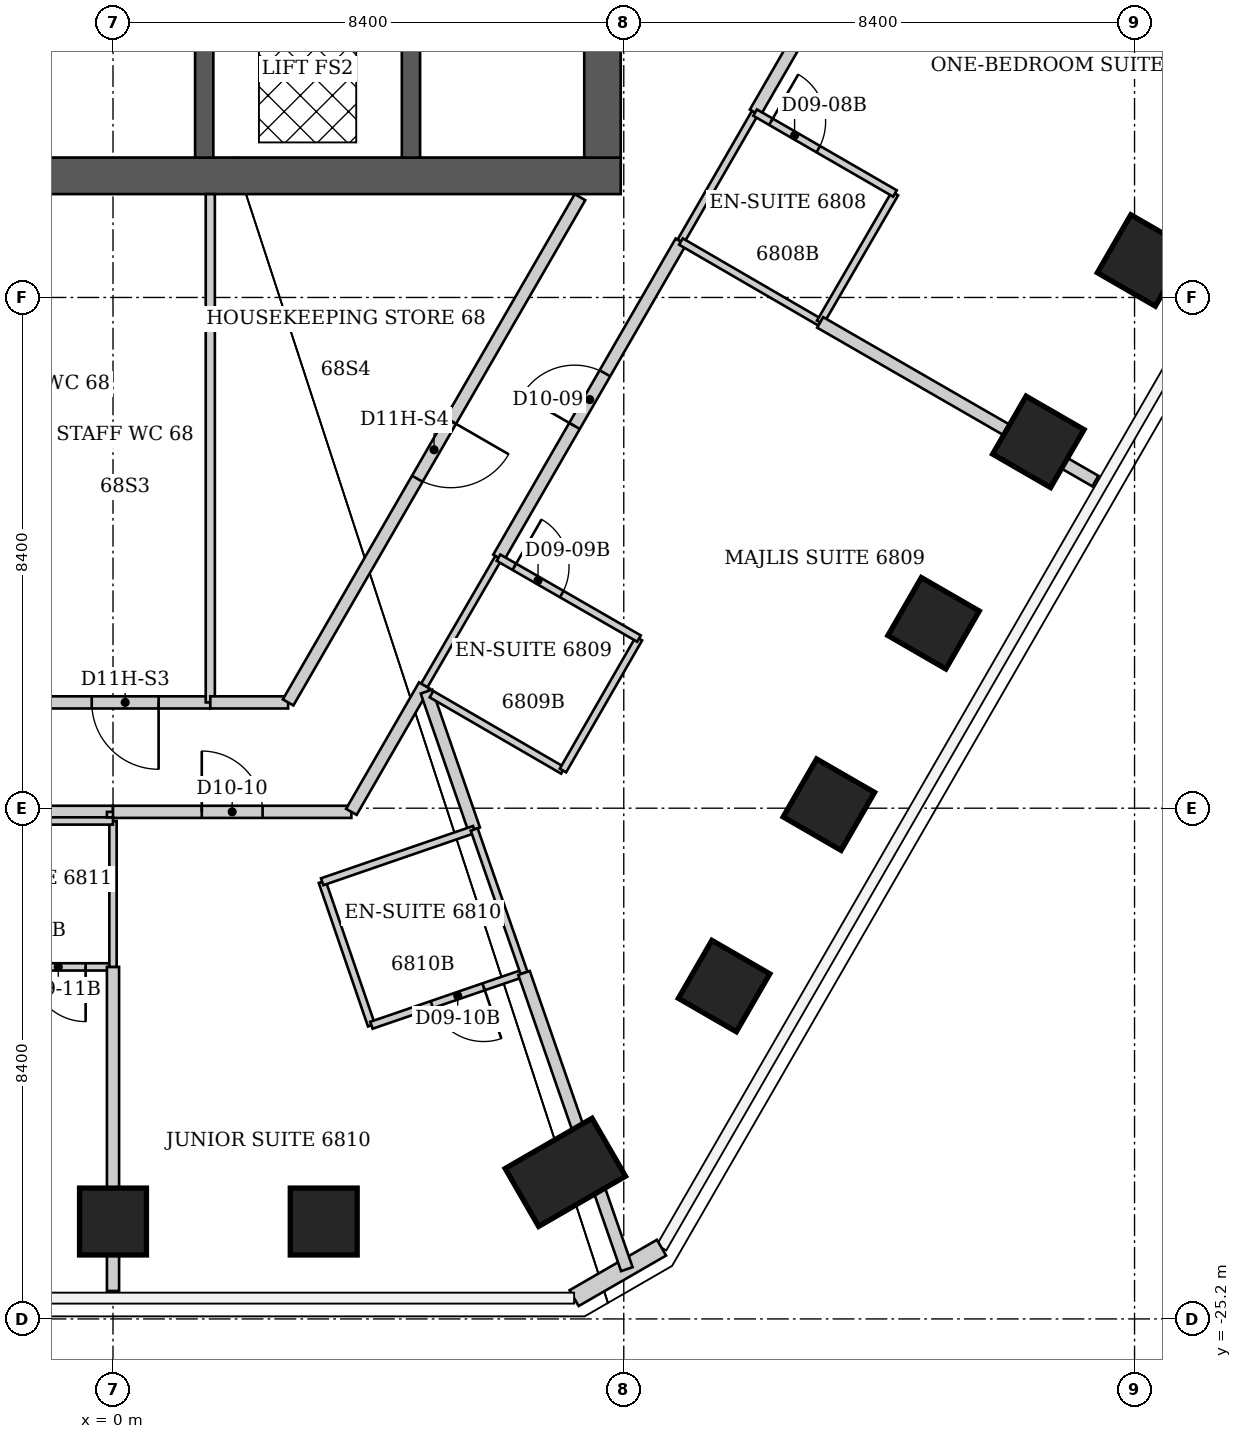
"""IFC4 building model, lengths in metres.
Left out: names, types, materials, properties, quantities, classifications, styles, units other than length and angle.
Written with IfcOpenShell. Run it as: python <this file> out.ifc"""

import sys

from ifc_helpers import new_model, si_unit, direction, frame, frame_2d, origin, origin_2d, place, context, subcontext, project, spatial, rectangle, extrude, element, fill, save


model = new_model("IFC4")
c1 = context("Model", 3, precision=1e-05, world=origin(), true_north=direction((0.0, 1.0)))
c2 = subcontext(c1, "Body", "Model", "MODEL_VIEW")
j1 = project(units=[si_unit("LENGTHUNIT", "METRE"), si_unit("PLANEANGLEUNIT", "RADIAN")], contexts=[c1])
p1 = place(None, origin())
s1 = spatial("IfcSite", under=j1, at=p1, CompositionType="ELEMENT")
p2 = place(p1, origin())
s2 = spatial("IfcBuilding", under=s1, at=p2, CompositionType="ELEMENT")
p3 = place(p2, frame((0.0, 0.0, 272.2)))
s3 = spatial("IfcBuildingStorey", under=s2, at=p3, CompositionType="ELEMENT", Elevation=272.2)
for number, where, z_axis, x_axis in (
    (1, (16.94, -7.792, 0.0), (0.0, 0.0, 1.0), (0.866, -0.5, 0.0)),
    (2, (15.218, -10.775, 0.0), (0.0, 0.0, 1.0), (0.866, -0.5, 0.0)),
    (3, (13.495, -13.759, 0.0), (0.0, 0.0, 1.0), (0.866, -0.5, 0.0)),
    (4, (11.773, -16.742, 0.0), (0.0, 0.0, 1.0), (0.866, -0.5, 0.0)),
    (5, (10.05, -19.725, 0.0), (0.0, 0.0, 1.0), (0.866, -0.5, 0.0)),
):
    element("IfcColumn", number, at=place(p3, frame(where, z_axis=z_axis, x_axis=x_axis)), inside=s3, PredefinedType="COLUMN", context=c2, shape_type="SweptSolid", body=[
        extrude(rectangle(XDim=1.1, YDim=1.1, at=origin_2d()), origin(), (0.0, 0.0, 1.0), 3.8),
    ])
p4 = place(p3, frame((7.439, -22.79, 0.0), z_axis=(0.0, 0.0, 1.0), x_axis=(0.5, -0.866025403784, 0.0)))
e6 = element("IfcColumn", 6, at=p4, inside=s3, PredefinedType="COLUMN", context=c2, shape_type="SweptSolid", body=[
    extrude(rectangle(XDim=1.1, YDim=1.65, at=origin_2d()), origin(), (0.0, 0.0, 1.0), 3.8),
])
for number, where, z_axis, x_axis in (
    (7, (3.466, -23.598, 0.0), (0.0, 0.0, 1.0), (0.0, -1.0, 0.0)),
    (8, (0.0, -23.598, 0.0), (0.0, 0.0, 1.0), (0.0, -1.0, 0.0)),
):
    element("IfcColumn", number, at=place(p3, frame(where, z_axis=z_axis, x_axis=x_axis)), inside=s3, PredefinedType="COLUMN", context=c2, shape_type="SweptSolid", body=[
        extrude(rectangle(XDim=1.1, YDim=1.1, at=origin_2d()), origin(), (0.0, 0.0, 1.0), 3.8),
    ])
p5 = place(p3, frame((-8.35, -6.4, 0.0), z_axis=(0.0, 0.0, 1.0), x_axis=(1.0, 0.0, 0.0)))
e9 = element("IfcWall", 9, at=p5, inside=s3, PredefinedType="SHEAR", context=c2, shape_type="SweptSolid", body=[
    extrude(rectangle(XDim=16.7, YDim=0.6, at=frame_2d((8.35, 0.0))), origin(), (0.0, 0.0, 1.0), 3.8),
])
p6 = place(p3, frame((8.05, -6.1, 0.0), z_axis=(0.0, 0.0, 1.0), x_axis=(0.0, 1.0, 0.0)))
e10 = element("IfcWall", 10, at=p6, inside=s3, PredefinedType="SHEAR", context=c2, shape_type="SweptSolid", body=[
    extrude(rectangle(XDim=12.2, YDim=0.6, at=frame_2d((6.1, 0.0))), origin(), (0.0, 0.0, 1.0), 3.8),
])
p7 = place(p6, frame((7.6, 0.0, 0.0)))
e11 = element("IfcOpeningElement", 11, at=p7, cuts=e10, PredefinedType="OPENING", context=c2, shape_type="SweptSolid", body=[
    extrude(rectangle(XDim=1.2, YDim=2.2, at=frame_2d((0.6, 1.1))), frame((0.0, 0.3, 0.0), z_axis=(0.0, -1.0, 0.0), x_axis=(1.0, 0.0, 0.0)), (0.0, 0.0, 1.0), 0.6),
])
for number, where, z_axis, x_axis in (
    (12, (1.5, -6.1, 0.0), (0.0, 0.0, 1.0), (0.0, 1.0, 0.0)),
    (13, (4.9, -6.1, 0.0), (0.0, 0.0, 1.0), (0.0, 1.0, 0.0)),
):
    element("IfcWall", number, at=place(p3, frame(where, z_axis=z_axis, x_axis=x_axis)), inside=s3, PredefinedType="SHEAR", context=c2, shape_type="SweptSolid", body=[
        extrude(rectangle(XDim=7.2, YDim=0.3, at=frame_2d((3.6, 0.0))), origin(), (0.0, 0.0, 1.0), 3.8),
    ])
p8 = place(p3, frame((9.021, -24.028, 0.0), z_axis=(0.0, 0.0, 1.0), x_axis=(-0.865989634427, -0.500061949227, 0.0)))
e14 = element("IfcWall", 14, at=p8, inside=s3, PredefinedType="SOLIDWALL", context=c2, shape_type="SweptSolid", body=[
    extrude(rectangle(XDim=1.66, YDim=0.3, at=frame_2d((0.83, 0.0))), origin(), (0.0, 0.0, 1.0), 3.64),
])
p9 = place(p3, frame((-3.92, -16.86, 0.0), z_axis=(0.0, 0.0, 1.0), x_axis=(1.0, 0.0, 0.0)))
e15 = element("IfcWall", 15, at=p9, inside=s3, PredefinedType="PARTITIONING", context=c2, shape_type="SweptSolid", body=[
    extrude(rectangle(XDim=3.92, YDim=0.2, at=frame_2d((1.96, 0.0))), origin(), (0.0, 0.0, 1.0), 3.64),
])
p10 = place(p3, frame((-2.6, -19.41, 0.0), z_axis=(0.0, 0.0, 1.0), x_axis=(1.0, 0.0, 0.0)))
e16 = element("IfcWall", 16, at=p10, inside=s3, PredefinedType="PARTITIONING", context=c2, shape_type="SweptSolid", body=[
    extrude(rectangle(XDim=2.6, YDim=0.12, at=frame_2d((1.3, 0.0))), origin(), (0.0, 0.0, 1.0), 3.64),
])
p11 = place(p10, frame((1.25, 0.0, 0.0)))
e17 = element("IfcOpeningElement", 17, at=p11, cuts=e16, PredefinedType="OPENING", context=c2, shape_type="SweptSolid", body=[
    extrude(rectangle(XDim=0.9, YDim=2.03, at=frame_2d((0.45, 1.015))), frame((0.0, 0.06, 0.0), z_axis=(0.0, -1.0, 0.0), x_axis=(1.0, 0.0, 0.0)), (0.0, 0.0, 1.0), 0.12),
])
p12 = place(p3, frame((0.0, -24.74, 0.0), z_axis=(0.0, 0.0, 1.0), x_axis=(0.0, 1.0, 0.0)))
e18 = element("IfcWall", 18, at=p12, inside=s3, PredefinedType="PARTITIONING", context=c2, shape_type="SweptSolid", body=[
    extrude(rectangle(XDim=5.33, YDim=0.2, at=frame_2d((2.665, 0.0))), origin(), (0.0, 0.0, 1.0), 2.86),
])
p13 = place(p3, frame((0.0, -19.41, 0.0), z_axis=(0.0, 0.0, 1.0), x_axis=(0.0, 1.0, 0.0)))
e19 = element("IfcWall", 19, at=p13, inside=s3, PredefinedType="PARTITIONING", context=c2, shape_type="SweptSolid", body=[
    extrude(rectangle(XDim=2.4, YDim=0.12, at=frame_2d((1.2, 0.0))), origin(), (0.0, 0.0, 1.0), 2.86),
])
p14 = place(p3, frame((0.0, -17.01, 0.0), z_axis=(0.0, 0.0, 1.0), x_axis=(-1.0, 0.0, 0.0)))
e20 = element("IfcWall", 20, at=p14, inside=s3, PredefinedType="PARTITIONING", context=c2, shape_type="SweptSolid", body=[
    extrude(rectangle(XDim=2.6, YDim=0.12, at=frame_2d((1.3, 0.0))), origin(), (0.0, 0.0, 1.0), 3.64),
])
p15 = place(p3, frame((0.0, -16.95, 0.0), z_axis=(0.0, 0.0, 1.0), x_axis=(0.0, 1.0, 0.0)))
e21 = element("IfcWall", 21, at=p15, inside=s3, PredefinedType="PARTITIONING", context=c2, shape_type="SweptSolid", body=[
    extrude(rectangle(XDim=0.09, YDim=0.2, at=frame_2d((0.045, 0.0))), origin(), (0.0, 0.0, 1.0), 3.64),
])
p16 = place(p3, frame((0.0, -16.86, 0.0), z_axis=(0.0, 0.0, 1.0), x_axis=(1.0, 0.0, 0.0)))
e22 = element("IfcWall", 22, at=p16, inside=s3, PredefinedType="PARTITIONING", context=c2, shape_type="SweptSolid", body=[
    extrude(rectangle(XDim=3.92, YDim=0.2, at=frame_2d((1.96, 0.0))), origin(), (0.0, 0.0, 1.0), 3.64),
])
p17 = place(p16, frame((1.46, 0.0, 0.0)))
e23 = element("IfcOpeningElement", 23, at=p17, cuts=e22, PredefinedType="OPENING", context=c2, shape_type="SweptSolid", body=[
    extrude(rectangle(XDim=1.0, YDim=2.13, at=frame_2d((0.5, 1.065))), frame((0.0, 0.1, 0.0), z_axis=(0.0, -1.0, 0.0), x_axis=(1.0, 0.0, 0.0)), (0.0, 0.0, 1.0), 0.2),
])
p18 = place(p3, frame((1.6, -15.06, 0.0), z_axis=(0.0, 0.0, 1.0), x_axis=(-1.0, 0.0, 0.0)))
e24 = element("IfcWall", 24, at=p18, inside=s3, PredefinedType="PARTITIONING", context=c2, shape_type="SweptSolid", body=[
    extrude(rectangle(XDim=2.8, YDim=0.2, at=frame_2d((1.4, 0.0))), origin(), (0.0, 0.0, 1.0), 3.64),
])
p19 = place(p18, frame((0.85, 0.0, 0.0)))
e25 = element("IfcOpeningElement", 25, at=p19, cuts=e24, PredefinedType="OPENING", context=c2, shape_type="SweptSolid", body=[
    extrude(rectangle(XDim=1.1, YDim=2.2, at=frame_2d((0.55, 1.1))), frame((0.0, 0.1, 0.0), z_axis=(0.0, -1.0, 0.0), x_axis=(1.0, 0.0, 0.0)), (0.0, 0.0, 1.0), 0.2),
])
p20 = place(p3, frame((1.6, -6.7, 0.0), z_axis=(0.0, 0.0, 1.0), x_axis=(0.0, -1.0, 0.0)))
e26 = element("IfcWall", 26, at=p20, inside=s3, PredefinedType="PARTITIONING", context=c2, shape_type="SweptSolid", body=[
    extrude(rectangle(XDim=8.36, YDim=0.15, at=frame_2d((4.18, 0.0))), origin(), (0.0, 0.0, 1.0), 2.86),
])
p21 = place(p3, frame((2.88, -15.06, 0.0), z_axis=(0.0, 0.0, 1.0), x_axis=(-1.0, 0.0, 0.0)))
e27 = element("IfcWall", 27, at=p21, inside=s3, PredefinedType="PARTITIONING", context=c2, shape_type="SweptSolid", body=[
    extrude(rectangle(XDim=1.28, YDim=0.2, at=frame_2d((0.64, 0.0))), origin(), (0.0, 0.0, 1.0), 3.64),
])
p22 = place(p3, frame((3.44, -18.01, 0.0), z_axis=(0.0, 0.0, 1.0), x_axis=(0.324669532971, -0.945827518293, 0.0)))
e28 = element("IfcWall", 28, at=p22, inside=s3, PredefinedType="PARTITIONING", context=c2, shape_type="SweptSolid", body=[
    extrude(rectangle(XDim=2.495, YDim=0.12, at=frame_2d((1.248, 0.0))), origin(), (0.0, 0.0, 1.0), 3.64),
])
p23 = place(p3, frame((3.92, -16.86, 0.0), z_axis=(0.0, 0.0, 1.0), x_axis=(0.499693115345, 0.866202511239, 0.0)))
e29 = element("IfcWall", 29, at=p23, inside=s3, PredefinedType="PARTITIONING", context=c2, shape_type="SweptSolid", body=[
    extrude(rectangle(XDim=2.401, YDim=0.2, at=frame_2d((1.201, 0.0))), origin(), (0.0, 0.0, 1.0), 3.64),
])
p24 = place(p3, frame((4.25, -20.37, 0.0), z_axis=(0.0, 0.0, 1.0), x_axis=(0.945999971947, 0.324166705687, 0.0)))
e30 = element("IfcWall", 30, at=p24, inside=s3, PredefinedType="PARTITIONING", context=c2, shape_type="SweptSolid", body=[
    extrude(rectangle(XDim=2.653, YDim=0.12, at=frame_2d((1.327, 0.0))), origin(), (0.0, 0.0, 1.0), 3.64),
])
p25 = place(p24, frame((1.05, 0.0, 0.0)))
e31 = element("IfcOpeningElement", 31, at=p25, cuts=e30, PredefinedType="OPENING", context=c2, shape_type="SweptSolid", body=[
    extrude(rectangle(XDim=0.9, YDim=2.03, at=frame_2d((0.45, 1.015))), frame((0.0, 0.06, 0.0), z_axis=(0.0, -1.0, 0.0), x_axis=(1.0, 0.0, 0.0)), (0.0, 0.0, 1.0), 0.12),
])
p26 = place(p3, frame((5.12, -14.78, 0.0), z_axis=(0.0, 0.0, 1.0), x_axis=(0.502307685327, 0.86468895521, 0.0)))
e32 = element("IfcWall", 32, at=p26, inside=s3, PredefinedType="PARTITIONING", context=c2, shape_type="SweptSolid", body=[
    extrude(rectangle(XDim=2.429, YDim=0.12, at=frame_2d((1.214, 0.0))), origin(), (0.0, 0.0, 1.0), 3.64),
])
p27 = place(p3, frame((5.155, -14.882, 0.0), z_axis=(0.0, 0.0, 1.0), x_axis=(0.326918410097, -0.945052566337, 0.0)))
e33 = element("IfcWall", 33, at=p27, inside=s3, PredefinedType="PARTITIONING", context=c2, shape_type="SweptSolid", body=[
    extrude(rectangle(XDim=2.4, YDim=0.2, at=frame_2d((1.2, 0.0))), origin(), (0.0, 0.0, 1.0), 3.64),
])
p28 = place(p3, frame((5.238, -14.925, 0.0), z_axis=(0.0, 0.0, 1.0), x_axis=(0.864924354574, -0.501902242339, 0.0)))
e34 = element("IfcWall", 34, at=p28, inside=s3, PredefinedType="PARTITIONING", context=c2, shape_type="SweptSolid", body=[
    extrude(rectangle(XDim=2.5, YDim=0.12, at=frame_2d((1.25, 0.0))), origin(), (0.0, 0.0, 1.0), 3.038),
])
p29 = place(p3, frame((5.94, -17.15, 0.0), z_axis=(0.0, 0.0, 1.0), x_axis=(-0.945601400786, -0.32532751318, 0.0)))
e35 = element("IfcWall", 35, at=p29, inside=s3, PredefinedType="PARTITIONING", context=c2, shape_type="SweptSolid", body=[
    extrude(rectangle(XDim=2.644, YDim=0.12, at=frame_2d((1.322, 0.0))), origin(), (0.0, 0.0, 1.0), 3.64),
])
p30 = place(p3, frame((5.94, -17.15, 0.0), z_axis=(0.0, 0.0, 1.0), x_axis=(0.32822120494, -0.944600889597, 0.0)))
e36 = element("IfcWall", 36, at=p30, inside=s3, PredefinedType="PARTITIONING", context=c2, shape_type="SweptSolid", body=[
    extrude(rectangle(XDim=2.499, YDim=0.12, at=frame_2d((1.249, 0.0))), origin(), (0.0, 0.0, 1.0), 3.64),
])
p31 = place(p3, frame((6.34, -12.68, 0.0), z_axis=(0.0, 0.0, 1.0), x_axis=(0.499725974117, 0.866183554908, 0.0)))
e37 = element("IfcWall", 37, at=p31, inside=s3, PredefinedType="PARTITIONING", context=c2, shape_type="SweptSolid", body=[
    extrude(rectangle(XDim=6.003, YDim=0.2, at=frame_2d((3.001, 0.0))), origin(), (0.0, 0.0, 1.0), 3.64),
])
p32 = place(p31, frame((2.502, 0.0, 0.0)))
e38 = element("IfcOpeningElement", 38, at=p32, cuts=e37, PredefinedType="OPENING", context=c2, shape_type="SweptSolid", body=[
    extrude(rectangle(XDim=1.0, YDim=2.13, at=frame_2d((0.5, 1.065))), frame((0.0, 0.1, 0.0), z_axis=(0.0, -1.0, 0.0), x_axis=(1.0, 0.0, 0.0)), (0.0, 0.0, 1.0), 0.2),
])
p33 = place(p3, frame((6.76, -19.51, 0.0), z_axis=(0.0, 0.0, 1.0), x_axis=(0.327780464108, -0.944753918938, 0.0)))
e39 = element("IfcWall", 39, at=p33, inside=s3, PredefinedType="PARTITIONING", context=c2, shape_type="SweptSolid", body=[
    extrude(rectangle(XDim=5.156, YDim=0.2, at=frame_2d((2.578, 0.0))), origin(), (0.0, 0.0, 1.0), 3.64),
])
p34 = place(p3, frame((7.4, -16.18, 0.0), z_axis=(0.0, 0.0, 1.0), x_axis=(0.499159685399, 0.866510016372, 0.0)))
e40 = element("IfcWall", 40, at=p34, inside=s3, PredefinedType="PARTITIONING", context=c2, shape_type="SweptSolid", body=[
    extrude(rectangle(XDim=2.504, YDim=0.12, at=frame_2d((1.252, 0.0))), origin(), (0.0, 0.0, 1.0), 3.64),
])
p35 = place(p3, frame((7.68, -6.75, 0.0), z_axis=(0.0, 0.0, 1.0), x_axis=(-0.500174600737, -0.865924574532, 0.0)))
e41 = element("IfcWall", 41, at=p35, inside=s3, PredefinedType="PARTITIONING", context=c2, shape_type="SweptSolid", body=[
    extrude(rectangle(XDim=9.597, YDim=0.2, at=frame_2d((4.798, 0.0))), origin(), (0.0, 0.0, 1.0), 3.64),
])
p36 = place(p35, frame((4.248, 0.0, 0.0)))
e42 = element("IfcOpeningElement", 42, at=p36, cuts=e41, PredefinedType="OPENING", context=c2, shape_type="SweptSolid", body=[
    extrude(rectangle(XDim=1.1, YDim=2.2, at=frame_2d((0.55, 1.1))), frame((0.0, 0.1, 0.0), z_axis=(0.0, -1.0, 0.0), x_axis=(1.0, 0.0, 0.0)), (0.0, 0.0, 1.0), 0.2),
])
p37 = place(p3, frame((8.65, -14.01, 0.0), z_axis=(0.0, 0.0, 1.0), x_axis=(-0.866592449628, 0.499016559092, 0.0)))
e43 = element("IfcWall", 43, at=p37, inside=s3, PredefinedType="PARTITIONING", context=c2, shape_type="SweptSolid", body=[
    extrude(rectangle(XDim=2.665, YDim=0.12, at=frame_2d((1.333, 0.0))), origin(), (0.0, 0.0, 1.0), 3.64),
])
p38 = place(p37, frame((1.466, 0.0, 0.0)))
e44 = element("IfcOpeningElement", 44, at=p38, cuts=e43, PredefinedType="OPENING", context=c2, shape_type="SweptSolid", body=[
    extrude(rectangle(XDim=0.9, YDim=2.03, at=frame_2d((0.45, 1.015))), frame((0.0, 0.06, 0.0), z_axis=(0.0, -1.0, 0.0), x_axis=(1.0, 0.0, 0.0)), (0.0, 0.0, 1.0), 0.12),
])
p39 = place(p3, frame((9.337, -7.478, 0.0), z_axis=(0.0, 0.0, 1.0), x_axis=(0.500186129468, 0.865917915214, 0.0)))
e45 = element("IfcWall", 45, at=p39, inside=s3, PredefinedType="PARTITIONING", context=c2, shape_type="SweptSolid", body=[
    extrude(rectangle(XDim=2.446, YDim=0.12, at=frame_2d((1.223, 0.0))), origin(), (0.0, 0.0, 1.0), 3.64),
])
p40 = place(p3, frame((9.34, -7.48, 0.0), z_axis=(0.0, 0.0, 1.0), x_axis=(0.864703697948, -0.502282305835, 0.0)))
e46 = element("IfcWall", 46, at=p40, inside=s3, PredefinedType="PARTITIONING", context=c2, shape_type="SweptSolid", body=[
    extrude(rectangle(XDim=2.648, YDim=0.12, at=frame_2d((1.324, 0.0))), origin(), (0.0, 0.0, 1.0), 3.038),
])
p41 = place(p3, frame((10.56, -5.36, 0.0), z_axis=(0.0, 0.0, 1.0), x_axis=(0.500162347976, 0.865931651845, 0.0)))
e47 = element("IfcWall", 47, at=p41, inside=s3, PredefinedType="PARTITIONING", context=c2, shape_type="SweptSolid", body=[
    extrude(rectangle(XDim=6.918, YDim=0.2, at=frame_2d((3.459, 0.0))), origin(), (0.0, 0.0, 1.0), 3.64),
])
p42 = place(p41, frame((2.959, 0.0, 0.0)))
e48 = element("IfcOpeningElement", 48, at=p42, cuts=e47, PredefinedType="OPENING", context=c2, shape_type="SweptSolid", body=[
    extrude(rectangle(XDim=1.0, YDim=2.13, at=frame_2d((0.5, 1.065))), frame((0.0, 0.1, 0.0), z_axis=(0.0, -1.0, 0.0), x_axis=(1.0, 0.0, 0.0)), (0.0, 0.0, 1.0), 0.2),
])
p43 = place(p3, frame((11.63, -8.81, 0.0), z_axis=(0.0, 0.0, 1.0), x_axis=(0.501888006485, 0.864932615264, 0.0)))
e49 = element("IfcWall", 49, at=p43, inside=s3, PredefinedType="PARTITIONING", context=c2, shape_type="SweptSolid", body=[
    extrude(rectangle(XDim=2.451, YDim=0.12, at=frame_2d((1.226, 0.0))), origin(), (0.0, 0.0, 1.0), 3.64),
])
p44 = place(p3, frame((12.86, -6.69, 0.0), z_axis=(0.0, 0.0, 1.0), x_axis=(-0.865675724273, 0.500605174168, 0.0)))
e50 = element("IfcWall", 50, at=p44, inside=s3, PredefinedType="PARTITIONING", context=c2, shape_type="SweptSolid", body=[
    extrude(rectangle(XDim=2.657, YDim=0.12, at=frame_2d((1.329, 0.0))), origin(), (0.0, 0.0, 1.0), 3.64),
])
p45 = place(p44, frame((1.457, 0.0, 0.0)))
e51 = element("IfcOpeningElement", 51, at=p45, cuts=e50, PredefinedType="OPENING", context=c2, shape_type="SweptSolid", body=[
    extrude(rectangle(XDim=0.9, YDim=2.03, at=frame_2d((0.45, 1.015))), frame((0.0, 0.06, 0.0), z_axis=(0.0, -1.0, 0.0), x_axis=(1.0, 0.0, 0.0)), (0.0, 0.0, 1.0), 0.12),
])
p46 = place(p3, frame((16.156, -11.42, 0.0), z_axis=(0.0, 0.0, 1.0), x_axis=(-0.866278144217, 0.499561984995, 0.0)))
e52 = element("IfcWall", 52, at=p46, inside=s3, PredefinedType="PARTITIONING", context=c2, shape_type="SweptSolid", body=[
    extrude(rectangle(XDim=5.225, YDim=0.2, at=frame_2d((2.612, 0.0))), origin(), (0.0, 0.0, 1.0), 3.64),
])
p47 = place(p45, origin())
e53 = element("IfcDoor", 53, at=p47, inside=s3, OperationType="SINGLE_SWING_RIGHT", PredefinedType="DOOR", context=c2, shape_type="SweptSolid", body=[
    extrude(rectangle(XDim=0.9, YDim=2.03, at=frame_2d((0.45, 1.015))), frame((0.0, 0.025, 0.0), z_axis=(0.0, -1.0, 0.0), x_axis=(1.0, 0.0, 0.0)), (0.0, 0.0, 1.0), 0.05),
])
fill(e51, e53)
p48 = place(p32, origin())
e54 = element("IfcDoor", 54, at=p48, inside=s3, OperationType="SINGLE_SWING_LEFT", PredefinedType="DOOR", context=c2, shape_type="SweptSolid", body=[
    extrude(rectangle(XDim=1.0, YDim=2.13, at=frame_2d((0.5, 1.065))), frame((0.0, 0.025, 0.0), z_axis=(0.0, -1.0, 0.0), x_axis=(1.0, 0.0, 0.0)), (0.0, 0.0, 1.0), 0.05),
])
fill(e38, e54)
p49 = place(p38, origin())
e55 = element("IfcDoor", 55, at=p49, inside=s3, OperationType="SINGLE_SWING_RIGHT", PredefinedType="DOOR", context=c2, shape_type="SweptSolid", body=[
    extrude(rectangle(XDim=0.9, YDim=2.03, at=frame_2d((0.45, 1.015))), frame((0.0, 0.025, 0.0), z_axis=(0.0, -1.0, 0.0), x_axis=(1.0, 0.0, 0.0)), (0.0, 0.0, 1.0), 0.05),
])
fill(e44, e55)
p50 = place(p17, origin())
e56 = element("IfcDoor", 56, at=p50, inside=s3, OperationType="SINGLE_SWING_LEFT", PredefinedType="DOOR", context=c2, shape_type="SweptSolid", body=[
    extrude(rectangle(XDim=1.0, YDim=2.13, at=frame_2d((0.5, 1.065))), frame((0.0, 0.025, 0.0), z_axis=(0.0, -1.0, 0.0), x_axis=(1.0, 0.0, 0.0)), (0.0, 0.0, 1.0), 0.05),
])
fill(e23, e56)
p51 = place(p25, origin())
e57 = element("IfcDoor", 57, at=p51, inside=s3, OperationType="SINGLE_SWING_RIGHT", PredefinedType="DOOR", context=c2, shape_type="SweptSolid", body=[
    extrude(rectangle(XDim=0.9, YDim=2.03, at=frame_2d((0.45, 1.015))), frame((0.0, 0.025, 0.0), z_axis=(0.0, -1.0, 0.0), x_axis=(1.0, 0.0, 0.0)), (0.0, 0.0, 1.0), 0.05),
])
fill(e31, e57)
p52 = place(p11, origin())
e58 = element("IfcDoor", 58, at=p52, inside=s3, OperationType="SINGLE_SWING_RIGHT", PredefinedType="DOOR", context=c2, shape_type="SweptSolid", body=[
    extrude(rectangle(XDim=0.9, YDim=2.03, at=frame_2d((0.45, 1.015))), frame((0.0, 0.025, 0.0), z_axis=(0.0, -1.0, 0.0), x_axis=(1.0, 0.0, 0.0)), (0.0, 0.0, 1.0), 0.05),
])
fill(e17, e58)
p53 = place(p19, origin())
e59 = element("IfcDoor", 59, at=p53, inside=s3, OperationType="SINGLE_SWING_LEFT", PredefinedType="DOOR", context=c2, shape_type="SweptSolid", body=[
    extrude(rectangle(XDim=1.1, YDim=2.2, at=frame_2d((0.55, 1.1))), frame((0.0, 0.025, 0.0), z_axis=(0.0, -1.0, 0.0), x_axis=(1.0, 0.0, 0.0)), (0.0, 0.0, 1.0), 0.05),
])
fill(e25, e59)
p54 = place(p36, origin())
e60 = element("IfcDoor", 60, at=p54, inside=s3, OperationType="SINGLE_SWING_LEFT", PredefinedType="DOOR", context=c2, shape_type="SweptSolid", body=[
    extrude(rectangle(XDim=1.1, YDim=2.2, at=frame_2d((0.55, 1.1))), frame((0.0, 0.025, 0.0), z_axis=(0.0, -1.0, 0.0), x_axis=(1.0, 0.0, 0.0)), (0.0, 0.0, 1.0), 0.05),
])
fill(e42, e60)
save(model, sys.argv[1])
